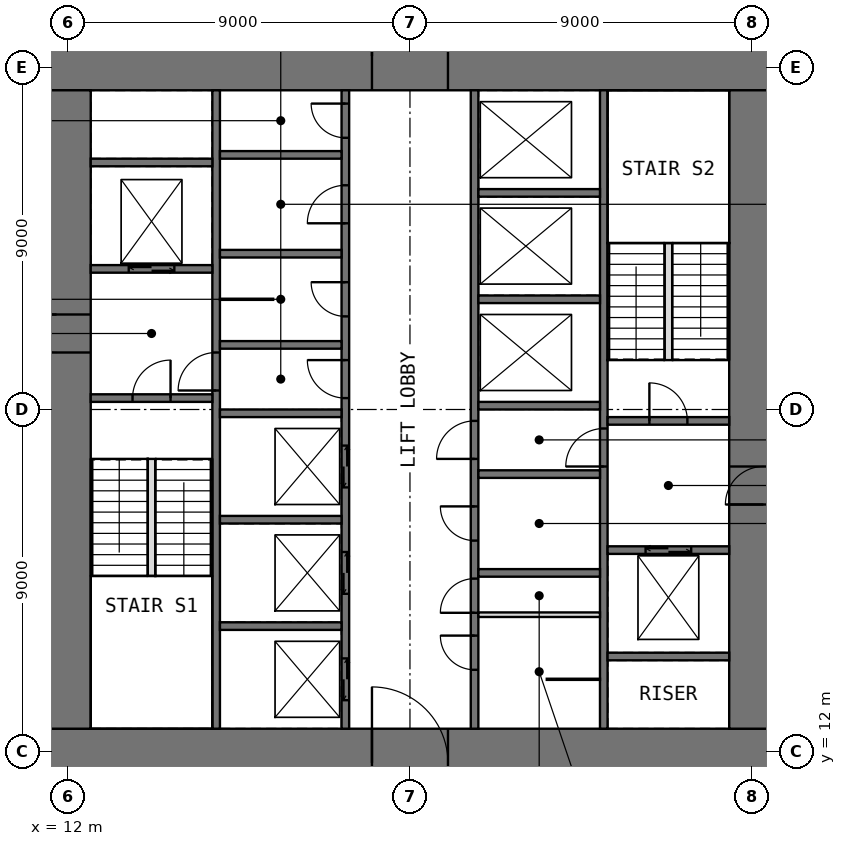
"""IFC4 building model, lengths in metres.
Left out: names, types, materials, properties, quantities, classifications, styles, units other than length and angle.
Written with IfcOpenShell. Run it as: python <this file> out.ifc"""

import sys

from ifc_helpers import new_model, si_unit, direction, frame, frame_2d, origin, place, context, subcontext, project, spatial, rectangle, extrude, element, fill, save


model = new_model("IFC4")
c1 = context("Model", 3, precision=1e-05, world=origin(), true_north=direction((0.0, 1.0)))
c2 = subcontext(c1, "Body", "Model", "MODEL_VIEW")
j1 = project(units=[si_unit("LENGTHUNIT", "METRE"), si_unit("PLANEANGLEUNIT", "RADIAN")], contexts=[c1])
p1 = place(None, origin())
s1 = spatial("IfcSite", under=j1, at=p1, CompositionType="ELEMENT")
p2 = place(p1, origin())
s2 = spatial("IfcBuilding", under=s1, at=p2, CompositionType="ELEMENT")
p3 = place(p2, frame((0.0, 0.0, 34.5)))
s3 = spatial("IfcBuildingStorey", under=s2, at=p3, CompositionType="ELEMENT", Elevation=34.5)
p4 = place(p3, frame((10.8, 11.7, -0.05), z_axis=(0.0, 0.0, 1.0), x_axis=(1.0, 0.0, 0.0)))
e1 = element("IfcWall", 1, at=p4, inside=s3, PredefinedType="SHEAR", context=c2, shape_type="SweptSolid", body=[
    extrude(rectangle(XDim=20.4, YDim=1.8, at=frame_2d((10.2, 0.0))), origin(), (0.0, 0.0, 1.0), 4.0),
])
p5 = place(p4, frame((9.2, 0.0, 0.05)))
e2 = element("IfcOpeningElement", 2, at=p5, cuts=e1, PredefinedType="OPENING", context=c2, shape_type="SweptSolid", body=[
    extrude(rectangle(XDim=2.0, YDim=2.2, at=frame_2d((1.0, 1.1))), frame((0.0, 0.91, 0.0), z_axis=(0.0, -1.0, 0.0), x_axis=(1.0, 0.0, 0.0)), (0.0, 0.0, 1.0), 1.82),
])
p6 = place(p3, frame((10.8, 30.3, -0.05), z_axis=(0.0, 0.0, 1.0), x_axis=(1.0, 0.0, 0.0)))
e3 = element("IfcWall", 3, at=p6, inside=s3, PredefinedType="SHEAR", context=c2, shape_type="SweptSolid", body=[
    extrude(rectangle(XDim=20.4, YDim=1.8, at=frame_2d((10.2, 0.0))), origin(), (0.0, 0.0, 1.0), 4.0),
])
p7 = place(p6, frame((9.2, 0.0, 0.05)))
e4 = element("IfcOpeningElement", 4, at=p7, cuts=e3, PredefinedType="OPENING", context=c2, shape_type="SweptSolid", body=[
    extrude(rectangle(XDim=2.0, YDim=2.2, at=frame_2d((1.0, 1.1))), frame((0.0, 0.91, 0.0), z_axis=(0.0, -1.0, 0.0), x_axis=(1.0, 0.0, 0.0)), (0.0, 0.0, 1.0), 1.82),
])
p8 = place(p3, frame((11.7, 12.6, -0.05), z_axis=(0.0, 0.0, 1.0), x_axis=(0.0, 1.0, 0.0)))
e5 = element("IfcWall", 5, at=p8, inside=s3, PredefinedType="SHEAR", context=c2, shape_type="SweptSolid", body=[
    extrude(rectangle(XDim=16.8, YDim=1.8, at=frame_2d((8.4, 0.0))), origin(), (0.0, 0.0, 1.0), 4.0),
])
p9 = place(p8, frame((9.9, 0.0, 0.05)))
e6 = element("IfcOpeningElement", 6, at=p9, cuts=e5, PredefinedType="OPENING", context=c2, shape_type="SweptSolid", body=[
    extrude(rectangle(XDim=1.0, YDim=2.2, at=frame_2d((0.5, 1.1))), frame((0.0, 0.91, 0.0), z_axis=(0.0, -1.0, 0.0), x_axis=(1.0, 0.0, 0.0)), (0.0, 0.0, 1.0), 1.82),
])
p10 = place(p3, frame((30.3, 12.6, -0.05), z_axis=(0.0, 0.0, 1.0), x_axis=(0.0, 1.0, 0.0)))
e7 = element("IfcWall", 7, at=p10, inside=s3, PredefinedType="SHEAR", context=c2, shape_type="SweptSolid", body=[
    extrude(rectangle(XDim=16.8, YDim=1.8, at=frame_2d((8.4, 0.0))), origin(), (0.0, 0.0, 1.0), 4.0),
])
p11 = place(p10, frame((5.9, 0.0, 0.05)))
e8 = element("IfcOpeningElement", 8, at=p11, cuts=e7, PredefinedType="OPENING", context=c2, shape_type="SweptSolid", body=[
    extrude(rectangle(XDim=1.0, YDim=2.2, at=frame_2d((0.5, 1.1))), frame((0.0, 0.91, 0.0), z_axis=(0.0, -1.0, 0.0), x_axis=(1.0, 0.0, 0.0)), (0.0, 0.0, 1.0), 1.82),
])
p12 = place(p3, frame((15.9, 12.6, -0.05), z_axis=(0.0, 0.0, 1.0), x_axis=(0.0, 1.0, 0.0)))
e9 = element("IfcWall", 9, at=p12, inside=s3, PredefinedType="SHEAR", context=c2, shape_type="SweptSolid", body=[
    extrude(rectangle(XDim=16.8, YDim=0.2, at=frame_2d((8.4, 0.0))), origin(), (0.0, 0.0, 1.0), 4.0),
])
p13 = place(p12, frame((8.9, 0.0, 0.05)))
e10 = element("IfcOpeningElement", 10, at=p13, cuts=e9, PredefinedType="OPENING", context=c2, shape_type="SweptSolid", body=[
    extrude(rectangle(XDim=1.0, YDim=2.2, at=frame_2d((0.5, 1.1))), frame((0.0, 0.11, 0.0), z_axis=(0.0, -1.0, 0.0), x_axis=(1.0, 0.0, 0.0)), (0.0, 0.0, 1.0), 0.22),
])
p14 = place(p3, frame((19.3, 12.6, -0.05), z_axis=(0.0, 0.0, 1.0), x_axis=(0.0, 1.0, 0.0)))
e11 = element("IfcWall", 11, at=p14, inside=s3, PredefinedType="SHEAR", context=c2, shape_type="SweptSolid", body=[
    extrude(rectangle(XDim=16.8, YDim=0.2, at=frame_2d((8.4, 0.0))), origin(), (0.0, 0.0, 1.0), 4.0),
])
p15 = place(p14, frame((8.7, 0.0, 0.05)))
e12 = element("IfcOpeningElement", 12, at=p15, cuts=e11, PredefinedType="OPENING", context=c2, shape_type="SweptSolid", body=[
    extrude(rectangle(XDim=1.0, YDim=2.2, at=frame_2d((0.5, 1.1))), frame((0.0, 0.11, 0.0), z_axis=(0.0, -1.0, 0.0), x_axis=(1.0, 0.0, 0.0)), (0.0, 0.0, 1.0), 0.22),
])
p16 = place(p14, frame((10.85, 0.0, 0.05)))
e13 = element("IfcOpeningElement", 13, at=p16, cuts=e11, PredefinedType="OPENING", context=c2, shape_type="SweptSolid", body=[
    extrude(rectangle(XDim=0.9, YDim=2.2, at=frame_2d((0.45, 1.1))), frame((0.0, 0.11, 0.0), z_axis=(0.0, -1.0, 0.0), x_axis=(1.0, 0.0, 0.0)), (0.0, 0.0, 1.0), 0.22),
])
p17 = place(p14, frame((13.3, 0.0, 0.05)))
e14 = element("IfcOpeningElement", 14, at=p17, cuts=e11, PredefinedType="OPENING", context=c2, shape_type="SweptSolid", body=[
    extrude(rectangle(XDim=1.0, YDim=2.2, at=frame_2d((0.5, 1.1))), frame((0.0, 0.11, 0.0), z_axis=(0.0, -1.0, 0.0), x_axis=(1.0, 0.0, 0.0)), (0.0, 0.0, 1.0), 0.22),
])
p18 = place(p14, frame((15.55, 0.0, 0.05)))
e15 = element("IfcOpeningElement", 15, at=p18, cuts=e11, PredefinedType="OPENING", context=c2, shape_type="SweptSolid", body=[
    extrude(rectangle(XDim=0.9, YDim=2.2, at=frame_2d((0.45, 1.1))), frame((0.0, 0.11, 0.0), z_axis=(0.0, -1.0, 0.0), x_axis=(1.0, 0.0, 0.0)), (0.0, 0.0, 1.0), 0.22),
])
p19 = place(p14, frame((0.75, 0.0, 0.05)))
e16 = element("IfcOpeningElement", 16, at=p19, cuts=e11, PredefinedType="OPENING", context=c2, shape_type="SweptSolid", body=[
    extrude(rectangle(XDim=1.1, YDim=2.2, at=frame_2d((0.55, 1.1))), frame((0.0, 0.11, 0.0), z_axis=(0.0, -1.0, 0.0), x_axis=(1.0, 0.0, 0.0)), (0.0, 0.0, 1.0), 0.22),
])
p20 = place(p14, frame((3.55, 0.0, 0.05)))
e17 = element("IfcOpeningElement", 17, at=p20, cuts=e11, PredefinedType="OPENING", context=c2, shape_type="SweptSolid", body=[
    extrude(rectangle(XDim=1.1, YDim=2.2, at=frame_2d((0.55, 1.1))), frame((0.0, 0.11, 0.0), z_axis=(0.0, -1.0, 0.0), x_axis=(1.0, 0.0, 0.0)), (0.0, 0.0, 1.0), 0.22),
])
p21 = place(p14, frame((6.35, 0.0, 0.05)))
e18 = element("IfcOpeningElement", 18, at=p21, cuts=e11, PredefinedType="OPENING", context=c2, shape_type="SweptSolid", body=[
    extrude(rectangle(XDim=1.1, YDim=2.2, at=frame_2d((0.55, 1.1))), frame((0.0, 0.11, 0.0), z_axis=(0.0, -1.0, 0.0), x_axis=(1.0, 0.0, 0.0)), (0.0, 0.0, 1.0), 0.22),
])
p22 = place(p3, frame((22.7, 12.6, -0.05), z_axis=(0.0, 0.0, 1.0), x_axis=(0.0, 1.0, 0.0)))
e19 = element("IfcWall", 19, at=p22, inside=s3, PredefinedType="SHEAR", context=c2, shape_type="SweptSolid", body=[
    extrude(rectangle(XDim=16.8, YDim=0.2, at=frame_2d((8.4, 0.0))), origin(), (0.0, 0.0, 1.0), 4.0),
])
p23 = place(p22, frame((3.05, 0.0, 0.05)))
e20 = element("IfcOpeningElement", 20, at=p23, cuts=e19, PredefinedType="OPENING", context=c2, shape_type="SweptSolid", body=[
    extrude(rectangle(XDim=0.9, YDim=2.2, at=frame_2d((0.45, 1.1))), frame((0.0, 0.11, 0.0), z_axis=(0.0, -1.0, 0.0), x_axis=(1.0, 0.0, 0.0)), (0.0, 0.0, 1.0), 0.22),
])
p24 = place(p22, frame((7.1, 0.0, 0.05)))
e21 = element("IfcOpeningElement", 21, at=p24, cuts=e19, PredefinedType="OPENING", context=c2, shape_type="SweptSolid", body=[
    extrude(rectangle(XDim=1.0, YDim=2.2, at=frame_2d((0.5, 1.1))), frame((0.0, 0.11, 0.0), z_axis=(0.0, -1.0, 0.0), x_axis=(1.0, 0.0, 0.0)), (0.0, 0.0, 1.0), 0.22),
])
p25 = place(p22, frame((1.55, 0.0, 0.05)))
e22 = element("IfcOpeningElement", 22, at=p25, cuts=e19, PredefinedType="OPENING", context=c2, shape_type="SweptSolid", body=[
    extrude(rectangle(XDim=0.9, YDim=2.2, at=frame_2d((0.45, 1.1))), frame((0.0, 0.11, 0.0), z_axis=(0.0, -1.0, 0.0), x_axis=(1.0, 0.0, 0.0)), (0.0, 0.0, 1.0), 0.22),
])
p26 = place(p22, frame((4.95, 0.0, 0.05)))
e23 = element("IfcOpeningElement", 23, at=p26, cuts=e19, PredefinedType="OPENING", context=c2, shape_type="SweptSolid", body=[
    extrude(rectangle(XDim=0.9, YDim=2.2, at=frame_2d((0.45, 1.1))), frame((0.0, 0.11, 0.0), z_axis=(0.0, -1.0, 0.0), x_axis=(1.0, 0.0, 0.0)), (0.0, 0.0, 1.0), 0.22),
])
p27 = place(p3, frame((26.1, 12.6, -0.05), z_axis=(0.0, 0.0, 1.0), x_axis=(0.0, 1.0, 0.0)))
e24 = element("IfcWall", 24, at=p27, inside=s3, PredefinedType="SHEAR", context=c2, shape_type="SweptSolid", body=[
    extrude(rectangle(XDim=16.8, YDim=0.2, at=frame_2d((8.4, 0.0))), origin(), (0.0, 0.0, 1.0), 4.0),
])
p28 = place(p27, frame((6.9, 0.0, 0.05)))
e25 = element("IfcOpeningElement", 25, at=p28, cuts=e24, PredefinedType="OPENING", context=c2, shape_type="SweptSolid", body=[
    extrude(rectangle(XDim=1.0, YDim=2.2, at=frame_2d((0.5, 1.1))), frame((0.0, 0.11, 0.0), z_axis=(0.0, -1.0, 0.0), x_axis=(1.0, 0.0, 0.0)), (0.0, 0.0, 1.0), 0.22),
])
p29 = place(p3, frame((12.6, 21.3, -0.05), z_axis=(0.0, 0.0, 1.0), x_axis=(1.0, 0.0, 0.0)))
e26 = element("IfcWall", 26, at=p29, inside=s3, PredefinedType="SHEAR", context=c2, shape_type="SweptSolid", body=[
    extrude(rectangle(XDim=3.2, YDim=0.2, at=frame_2d((1.6, 0.0))), origin(), (0.0, 0.0, 1.0), 4.0),
])
p30 = place(p29, frame((1.1, 0.0, 0.05)))
e27 = element("IfcOpeningElement", 27, at=p30, cuts=e26, PredefinedType="OPENING", context=c2, shape_type="SweptSolid", body=[
    extrude(rectangle(XDim=1.0, YDim=2.2, at=frame_2d((0.5, 1.1))), frame((0.0, 0.11, 0.0), z_axis=(0.0, -1.0, 0.0), x_axis=(1.0, 0.0, 0.0)), (0.0, 0.0, 1.0), 0.22),
])
p31 = place(p3, frame((12.6, 24.7, -0.05), z_axis=(0.0, 0.0, 1.0), x_axis=(1.0, 0.0, 0.0)))
e28 = element("IfcWall", 28, at=p31, inside=s3, PredefinedType="SHEAR", context=c2, shape_type="SweptSolid", body=[
    extrude(rectangle(XDim=3.2, YDim=0.2, at=frame_2d((1.6, 0.0))), origin(), (0.0, 0.0, 1.0), 4.0),
])
p32 = place(p31, frame((1.0, 0.0, 0.05)))
e29 = element("IfcOpeningElement", 29, at=p32, cuts=e28, PredefinedType="OPENING", context=c2, shape_type="SweptSolid", body=[
    extrude(rectangle(XDim=1.2, YDim=2.2, at=frame_2d((0.6, 1.1))), frame((0.0, 0.11, 0.0), z_axis=(0.0, -1.0, 0.0), x_axis=(1.0, 0.0, 0.0)), (0.0, 0.0, 1.0), 0.22),
])
for number, where, z_axis, x_axis in (
    (30, (12.6, 27.5, -0.05), (0.0, 0.0, 1.0), (1.0, 0.0, 0.0)),
    (31, (16.0, 15.3, -0.05), (0.0, 0.0, 1.0), (1.0, 0.0, 0.0)),
    (32, (16.0, 18.1, -0.05), (0.0, 0.0, 1.0), (1.0, 0.0, 0.0)),
    (33, (16.0, 20.9, -0.05), (0.0, 0.0, 1.0), (1.0, 0.0, 0.0)),
    (34, (16.0, 22.7, -0.05), (0.0, 0.0, 1.0), (1.0, 0.0, 0.0)),
    (35, (16.0, 25.1, -0.05), (0.0, 0.0, 1.0), (1.0, 0.0, 0.0)),
    (36, (16.0, 27.7, -0.05), (0.0, 0.0, 1.0), (1.0, 0.0, 0.0)),
    (37, (22.8, 16.7, -0.05), (0.0, 0.0, 1.0), (1.0, 0.0, 0.0)),
    (38, (22.8, 19.3, -0.05), (0.0, 0.0, 1.0), (1.0, 0.0, 0.0)),
    (39, (22.8, 21.1, -0.05), (0.0, 0.0, 1.0), (1.0, 0.0, 0.0)),
    (40, (22.8, 23.9, -0.05), (0.0, 0.0, 1.0), (1.0, 0.0, 0.0)),
    (41, (22.8, 26.7, -0.05), (0.0, 0.0, 1.0), (1.0, 0.0, 0.0)),
    (42, (26.2, 14.5, -0.05), (0.0, 0.0, 1.0), (1.0, 0.0, 0.0)),
):
    element("IfcWall", number, at=place(p3, frame(where, z_axis=z_axis, x_axis=x_axis)), inside=s3, PredefinedType="SHEAR", context=c2, shape_type="SweptSolid", body=[
        extrude(rectangle(XDim=3.2, YDim=0.2, at=frame_2d((1.6, 0.0))), origin(), (0.0, 0.0, 1.0), 4.0),
    ])
p33 = place(p3, frame((26.2, 17.3, -0.05), z_axis=(0.0, 0.0, 1.0), x_axis=(1.0, 0.0, 0.0)))
e43 = element("IfcWall", 43, at=p33, inside=s3, PredefinedType="SHEAR", context=c2, shape_type="SweptSolid", body=[
    extrude(rectangle(XDim=3.2, YDim=0.2, at=frame_2d((1.6, 0.0))), origin(), (0.0, 0.0, 1.0), 4.0),
])
p34 = place(p33, frame((1.0, 0.0, 0.05)))
e44 = element("IfcOpeningElement", 44, at=p34, cuts=e43, PredefinedType="OPENING", context=c2, shape_type="SweptSolid", body=[
    extrude(rectangle(XDim=1.2, YDim=2.2, at=frame_2d((0.6, 1.1))), frame((0.0, 0.11, 0.0), z_axis=(0.0, -1.0, 0.0), x_axis=(1.0, 0.0, 0.0)), (0.0, 0.0, 1.0), 0.22),
])
p35 = place(p3, frame((26.2, 20.7, -0.05), z_axis=(0.0, 0.0, 1.0), x_axis=(1.0, 0.0, 0.0)))
e45 = element("IfcWall", 45, at=p35, inside=s3, PredefinedType="SHEAR", context=c2, shape_type="SweptSolid", body=[
    extrude(rectangle(XDim=3.2, YDim=0.2, at=frame_2d((1.6, 0.0))), origin(), (0.0, 0.0, 1.0), 4.0),
])
p36 = place(p35, frame((1.1, 0.0, 0.05)))
e46 = element("IfcOpeningElement", 46, at=p36, cuts=e45, PredefinedType="OPENING", context=c2, shape_type="SweptSolid", body=[
    extrude(rectangle(XDim=1.0, YDim=2.2, at=frame_2d((0.5, 1.1))), frame((0.0, 0.11, 0.0), z_axis=(0.0, -1.0, 0.0), x_axis=(1.0, 0.0, 0.0)), (0.0, 0.0, 1.0), 0.22),
])
p37 = place(p3, frame((22.8, 15.6, 0.0), z_axis=(0.0, 0.0, 1.0), x_axis=(1.0, 0.0, 0.0)))
e47 = element("IfcWall", 47, at=p37, inside=s3, PredefinedType="PARTITIONING", context=c2, shape_type="SweptSolid", body=[
    extrude(rectangle(XDim=3.2, YDim=0.12, at=frame_2d((1.6, 0.0))), origin(), (0.0, 0.0, 1.0), 3.75),
])
for number, where, z_axis, x_axis in (
    (48, (24.6, 13.9, 0.0), (0.0, 0.0, 1.0), (1.0, 0.0, 0.0)),
    (49, (16.0, 23.9, 0.0), (0.0, 0.0, 1.0), (1.0, 0.0, 0.0)),
):
    element("IfcWall", number, at=place(p3, frame(where, z_axis=z_axis, x_axis=x_axis)), inside=s3, PredefinedType="PARTITIONING", context=c2, shape_type="SweptSolid", body=[
        extrude(rectangle(XDim=1.4, YDim=0.03, at=frame_2d((0.7, 0.0))), origin(), (0.0, 0.0, 1.0), 3.75),
    ])
for number, where, z_axis, x_axis in (
    (50, (14.2, 16.62, 0.0), (0.0, 0.0, 1.0), (0.0, 1.0, 0.0)),
    (51, (27.8, 22.3, 0.0), (0.0, 0.0, 1.0), (0.0, 1.0, 0.0)),
):
    element("IfcWall", number, at=place(p3, frame(where, z_axis=z_axis, x_axis=x_axis)), inside=s3, PredefinedType="PARTITIONING", context=c2, shape_type="SweptSolid", body=[
        extrude(rectangle(XDim=3.08, YDim=0.2, at=frame_2d((1.54, 0.0))), origin(), (0.0, 0.0, 1.0), 4.0),
    ])
p38 = place(p5, origin())
e52 = element("IfcDoor", 52, at=p38, inside=s3, OperationType="DOUBLE_DOOR_SINGLE_SWING", PredefinedType="DOOR", context=c2, shape_type="SweptSolid", body=[
    extrude(rectangle(XDim=2.0, YDim=2.2, at=frame_2d((1.0, 1.1))), frame((0.0, 0.025, 0.0), z_axis=(0.0, -1.0, 0.0), x_axis=(1.0, 0.0, 0.0)), (0.0, 0.0, 1.0), 0.05),
])
fill(e2, e52)
p39 = place(p7, origin())
e53 = element("IfcDoor", 53, at=p39, inside=s3, OperationType="DOUBLE_DOOR_SINGLE_SWING", PredefinedType="DOOR", context=c2, shape_type="SweptSolid", body=[
    extrude(rectangle(XDim=2.0, YDim=2.2, at=frame_2d((1.0, 1.1))), frame((0.0, 0.025, 0.0), z_axis=(0.0, -1.0, 0.0), x_axis=(1.0, 0.0, 0.0)), (0.0, 0.0, 1.0), 0.05),
])
fill(e4, e53)
p40 = place(p23, origin())
e54 = element("IfcDoor", 54, at=p40, inside=s3, OperationType="SINGLE_SWING_LEFT", PredefinedType="DOOR", context=c2, shape_type="SweptSolid", body=[
    extrude(rectangle(XDim=0.9, YDim=2.2, at=frame_2d((0.45, 1.1))), frame((0.0, 0.025, 0.0), z_axis=(0.0, -1.0, 0.0), x_axis=(1.0, 0.0, 0.0)), (0.0, 0.0, 1.0), 0.05),
])
fill(e20, e54)
p41 = place(p9, origin())
e55 = element("IfcDoor", 55, at=p41, inside=s3, OperationType="SINGLE_SWING_RIGHT", PredefinedType="DOOR", context=c2, shape_type="SweptSolid", body=[
    extrude(rectangle(XDim=1.0, YDim=2.2, at=frame_2d((0.5, 1.1))), frame((0.0, 0.025, 0.0), z_axis=(0.0, -1.0, 0.0), x_axis=(1.0, 0.0, 0.0)), (0.0, 0.0, 1.0), 0.05),
])
fill(e6, e55)
p42 = place(p11, origin())
e56 = element("IfcDoor", 56, at=p42, inside=s3, OperationType="SINGLE_SWING_LEFT", PredefinedType="DOOR", context=c2, shape_type="SweptSolid", body=[
    extrude(rectangle(XDim=1.0, YDim=2.2, at=frame_2d((0.5, 1.1))), frame((0.0, 0.025, 0.0), z_axis=(0.0, -1.0, 0.0), x_axis=(1.0, 0.0, 0.0)), (0.0, 0.0, 1.0), 0.05),
])
fill(e8, e56)
p43 = place(p30, origin())
e57 = element("IfcDoor", 57, at=p43, inside=s3, OperationType="SINGLE_SWING_RIGHT", PredefinedType="DOOR", context=c2, shape_type="SweptSolid", body=[
    extrude(rectangle(XDim=1.0, YDim=2.2, at=frame_2d((0.5, 1.1))), frame((0.0, 0.025, 0.0), z_axis=(0.0, -1.0, 0.0), x_axis=(1.0, 0.0, 0.0)), (0.0, 0.0, 1.0), 0.05),
])
fill(e27, e57)
p44 = place(p36, origin())
e58 = element("IfcDoor", 58, at=p44, inside=s3, OperationType="SINGLE_SWING_LEFT", PredefinedType="DOOR", context=c2, shape_type="SweptSolid", body=[
    extrude(rectangle(XDim=1.0, YDim=2.2, at=frame_2d((0.5, 1.1))), frame((0.0, 0.025, 0.0), z_axis=(0.0, -1.0, 0.0), x_axis=(1.0, 0.0, 0.0)), (0.0, 0.0, 1.0), 0.05),
])
fill(e46, e58)
p45 = place(p13, origin())
e59 = element("IfcDoor", 59, at=p45, inside=s3, OperationType="SINGLE_SWING_LEFT", PredefinedType="DOOR", context=c2, shape_type="SweptSolid", body=[
    extrude(rectangle(XDim=1.0, YDim=2.2, at=frame_2d((0.5, 1.1))), frame((0.0, 0.025, 0.0), z_axis=(0.0, -1.0, 0.0), x_axis=(1.0, 0.0, 0.0)), (0.0, 0.0, 1.0), 0.05),
])
fill(e10, e59)
p46 = place(p28, origin())
e60 = element("IfcDoor", 60, at=p46, inside=s3, OperationType="SINGLE_SWING_LEFT", PredefinedType="DOOR", context=c2, shape_type="SweptSolid", body=[
    extrude(rectangle(XDim=1.0, YDim=2.2, at=frame_2d((0.5, 1.1))), frame((0.0, 0.025, 0.0), z_axis=(0.0, -1.0, 0.0), x_axis=(1.0, 0.0, 0.0)), (0.0, 0.0, 1.0), 0.05),
])
fill(e25, e60)
p47 = place(p15, origin())
e61 = element("IfcDoor", 61, at=p47, inside=s3, OperationType="SINGLE_SWING_RIGHT", PredefinedType="DOOR", context=c2, shape_type="SweptSolid", body=[
    extrude(rectangle(XDim=1.0, YDim=2.2, at=frame_2d((0.5, 1.1))), frame((0.0, 0.025, 0.0), z_axis=(0.0, -1.0, 0.0), x_axis=(1.0, 0.0, 0.0)), (0.0, 0.0, 1.0), 0.05),
])
fill(e12, e61)
p48 = place(p24, origin())
e62 = element("IfcDoor", 62, at=p48, inside=s3, OperationType="SINGLE_SWING_LEFT", PredefinedType="DOOR", context=c2, shape_type="SweptSolid", body=[
    extrude(rectangle(XDim=1.0, YDim=2.2, at=frame_2d((0.5, 1.1))), frame((0.0, 0.025, 0.0), z_axis=(0.0, -1.0, 0.0), x_axis=(1.0, 0.0, 0.0)), (0.0, 0.0, 1.0), 0.05),
])
fill(e21, e62)
p49 = place(p16, origin())
e63 = element("IfcDoor", 63, at=p49, inside=s3, OperationType="SINGLE_SWING_RIGHT", PredefinedType="DOOR", context=c2, shape_type="SweptSolid", body=[
    extrude(rectangle(XDim=0.9, YDim=2.2, at=frame_2d((0.45, 1.1))), frame((0.0, 0.025, 0.0), z_axis=(0.0, -1.0, 0.0), x_axis=(1.0, 0.0, 0.0)), (0.0, 0.0, 1.0), 0.05),
])
fill(e13, e63)
p50 = place(p17, origin())
e64 = element("IfcDoor", 64, at=p50, inside=s3, OperationType="SINGLE_SWING_LEFT", PredefinedType="DOOR", context=c2, shape_type="SweptSolid", body=[
    extrude(rectangle(XDim=1.0, YDim=2.2, at=frame_2d((0.5, 1.1))), frame((0.0, 0.025, 0.0), z_axis=(0.0, -1.0, 0.0), x_axis=(1.0, 0.0, 0.0)), (0.0, 0.0, 1.0), 0.05),
])
fill(e14, e64)
p51 = place(p18, origin())
e65 = element("IfcDoor", 65, at=p51, inside=s3, OperationType="SINGLE_SWING_RIGHT", PredefinedType="DOOR", context=c2, shape_type="SweptSolid", body=[
    extrude(rectangle(XDim=0.9, YDim=2.2, at=frame_2d((0.45, 1.1))), frame((0.0, 0.025, 0.0), z_axis=(0.0, -1.0, 0.0), x_axis=(1.0, 0.0, 0.0)), (0.0, 0.0, 1.0), 0.05),
])
fill(e15, e65)
p52 = place(p25, origin())
e66 = element("IfcDoor", 66, at=p52, inside=s3, OperationType="SINGLE_SWING_RIGHT", PredefinedType="DOOR", context=c2, shape_type="SweptSolid", body=[
    extrude(rectangle(XDim=0.9, YDim=2.2, at=frame_2d((0.45, 1.1))), frame((0.0, 0.025, 0.0), z_axis=(0.0, -1.0, 0.0), x_axis=(1.0, 0.0, 0.0)), (0.0, 0.0, 1.0), 0.05),
])
fill(e22, e66)
p53 = place(p26, origin())
e67 = element("IfcDoor", 67, at=p53, inside=s3, OperationType="SINGLE_SWING_RIGHT", PredefinedType="DOOR", context=c2, shape_type="SweptSolid", body=[
    extrude(rectangle(XDim=0.9, YDim=2.2, at=frame_2d((0.45, 1.1))), frame((0.0, 0.025, 0.0), z_axis=(0.0, -1.0, 0.0), x_axis=(1.0, 0.0, 0.0)), (0.0, 0.0, 1.0), 0.05),
])
fill(e23, e67)
p54 = place(p19, origin())
e68 = element("IfcDoor", 68, at=p54, inside=s3, OperationType="DOUBLE_DOOR_SLIDING", PredefinedType="DOOR", context=c2, shape_type="SweptSolid", body=[
    extrude(rectangle(XDim=1.1, YDim=2.2, at=frame_2d((0.55, 1.1))), frame((0.0, 0.025, 0.0), z_axis=(0.0, -1.0, 0.0), x_axis=(1.0, 0.0, 0.0)), (0.0, 0.0, 1.0), 0.05),
])
fill(e16, e68)
p55 = place(p20, origin())
e69 = element("IfcDoor", 69, at=p55, inside=s3, OperationType="DOUBLE_DOOR_SLIDING", PredefinedType="DOOR", context=c2, shape_type="SweptSolid", body=[
    extrude(rectangle(XDim=1.1, YDim=2.2, at=frame_2d((0.55, 1.1))), frame((0.0, 0.025, 0.0), z_axis=(0.0, -1.0, 0.0), x_axis=(1.0, 0.0, 0.0)), (0.0, 0.0, 1.0), 0.05),
])
fill(e17, e69)
p56 = place(p21, origin())
e70 = element("IfcDoor", 70, at=p56, inside=s3, OperationType="DOUBLE_DOOR_SLIDING", PredefinedType="DOOR", context=c2, shape_type="SweptSolid", body=[
    extrude(rectangle(XDim=1.1, YDim=2.2, at=frame_2d((0.55, 1.1))), frame((0.0, 0.025, 0.0), z_axis=(0.0, -1.0, 0.0), x_axis=(1.0, 0.0, 0.0)), (0.0, 0.0, 1.0), 0.05),
])
fill(e18, e70)
p57 = place(p32, origin())
e71 = element("IfcDoor", 71, at=p57, inside=s3, OperationType="DOUBLE_DOOR_SLIDING", PredefinedType="DOOR", context=c2, shape_type="SweptSolid", body=[
    extrude(rectangle(XDim=1.2, YDim=2.2, at=frame_2d((0.6, 1.1))), frame((0.0, 0.025, 0.0), z_axis=(0.0, -1.0, 0.0), x_axis=(1.0, 0.0, 0.0)), (0.0, 0.0, 1.0), 0.05),
])
fill(e29, e71)
p58 = place(p34, origin())
e72 = element("IfcDoor", 72, at=p58, inside=s3, OperationType="DOUBLE_DOOR_SLIDING", PredefinedType="DOOR", context=c2, shape_type="SweptSolid", body=[
    extrude(rectangle(XDim=1.2, YDim=2.2, at=frame_2d((0.6, 1.1))), frame((0.0, 0.025, 0.0), z_axis=(0.0, -1.0, 0.0), x_axis=(1.0, 0.0, 0.0)), (0.0, 0.0, 1.0), 0.05),
])
fill(e44, e72)
save(model, sys.argv[1])
